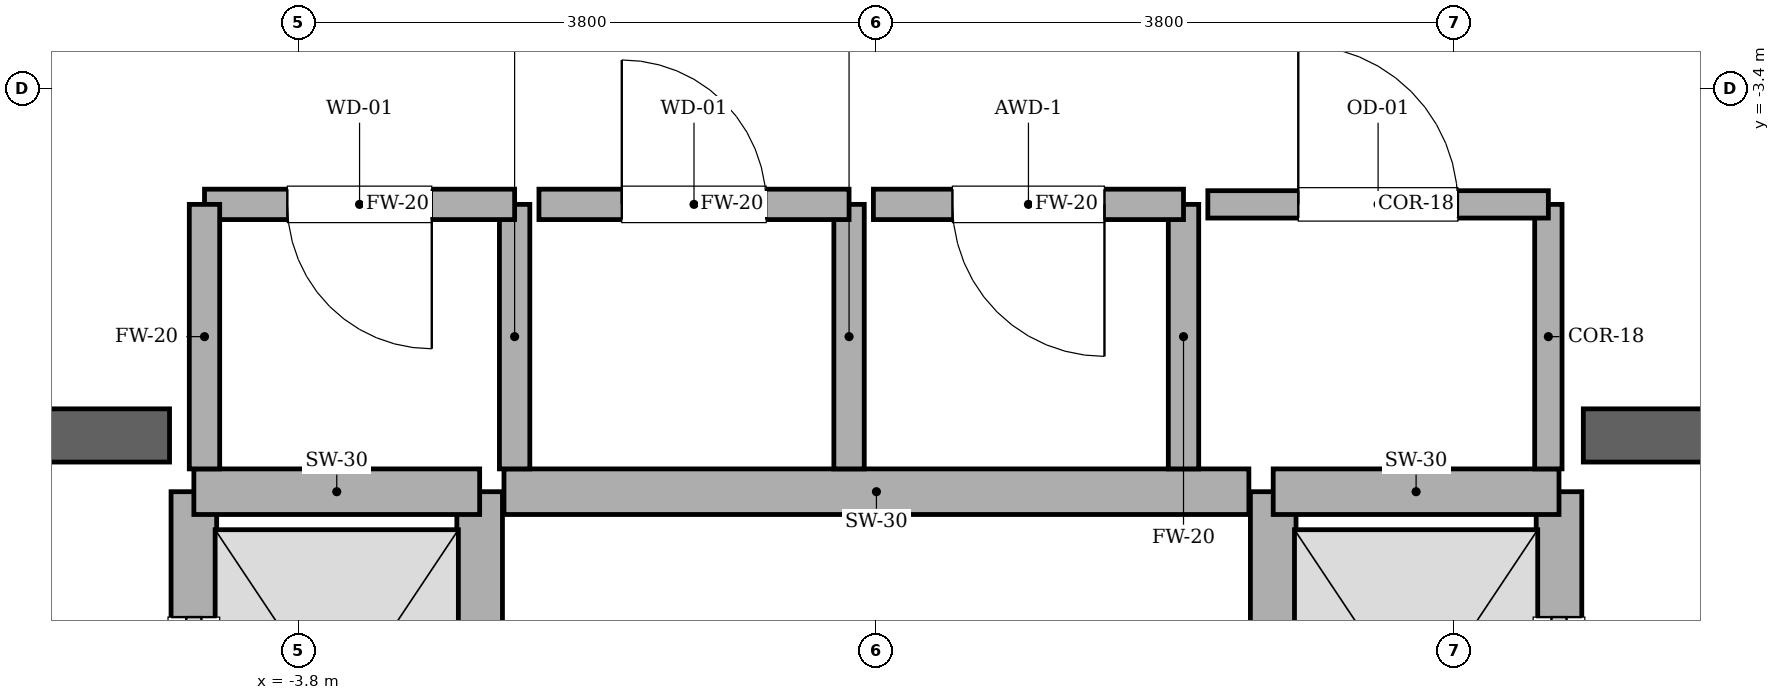
"""IFC4 building model, lengths in metres.
Left out: names, types, materials, properties, quantities, classifications, styles, units other than length and angle.
Written with IfcOpenShell. Run it as: python <this file> out.ifc"""

import sys

from ifc_helpers import new_model, si_unit, direction, frame, frame_2d, origin, place, context, subcontext, project, spatial, rectangle, extrude, element, fill, save


model = new_model("IFC4")
c1 = context("Model", 3, precision=1e-05, world=origin(), true_north=direction((0.0, 1.0)))
c2 = subcontext(c1, "Body", "Model", "MODEL_VIEW")
j1 = project(units=[si_unit("LENGTHUNIT", "METRE"), si_unit("PLANEANGLEUNIT", "RADIAN")], contexts=[c1])
p1 = place(None, origin())
s1 = spatial("IfcSite", under=j1, at=p1, CompositionType="ELEMENT")
p2 = place(p1, origin())
s2 = spatial("IfcBuilding", under=s1, at=p2, CompositionType="ELEMENT")
p3 = place(p2, frame((0.0, 0.0, 28.2)))
s3 = spatial("IfcBuildingStorey", under=s2, at=p3, CompositionType="ELEMENT", Elevation=28.2)
p4 = place(p3, frame((-9.825, -5.68, 0.0), z_axis=(0.0, 0.0, 1.0), x_axis=(1.0, 0.0, 0.0)))
e1 = element("IfcWall", 1, at=p4, inside=s3, PredefinedType="SOLIDWALL", context=c2, shape_type="SweptSolid", body=[
    extrude(rectangle(XDim=5.175, YDim=0.35, at=frame_2d((2.587, 0.0))), origin(), (0.0, 0.0, 1.0), 4.05),
])
p5 = place(p4, frame((1.285, 0.0, 0.0)))
e2 = element("IfcOpeningElement", 2, at=p5, cuts=e1, PredefinedType="OPENING", context=c2, shape_type="SweptSolid", body=[
    extrude(rectangle(XDim=1.18, YDim=2.2, at=frame_2d((0.59, 1.1))), frame((0.0, 0.185, 0.0), z_axis=(0.0, -1.0, 0.0), x_axis=(1.0, 0.0, 0.0)), (0.0, 0.0, 1.0), 0.37),
])
p6 = place(p3, frame((4.65, -5.68, 0.0), z_axis=(0.0, 0.0, 1.0), x_axis=(1.0, 0.0, 0.0)))
e3 = element("IfcWall", 3, at=p6, inside=s3, PredefinedType="SOLIDWALL", context=c2, shape_type="SweptSolid", body=[
    extrude(rectangle(XDim=5.175, YDim=0.35, at=frame_2d((2.587, 0.0))), origin(), (0.0, 0.0, 1.0), 4.05),
])
p7 = place(p6, frame((2.71, 0.0, 0.0)))
e4 = element("IfcOpeningElement", 4, at=p7, cuts=e3, PredefinedType="OPENING", context=c2, shape_type="SweptSolid", body=[
    extrude(rectangle(XDim=1.18, YDim=2.2, at=frame_2d((0.59, 1.1))), frame((0.0, 0.185, 0.0), z_axis=(0.0, -1.0, 0.0), x_axis=(1.0, 0.0, 0.0)), (0.0, 0.0, 1.0), 0.37),
])
p8 = place(p3, frame((-4.49, -8.82, 0.0), z_axis=(0.0, 0.0, 1.0), x_axis=(0.0, 1.0, 0.0)))
e5 = element("IfcWall", 5, at=p8, inside=s3, PredefinedType="SOLIDWALL", context=c2, shape_type="SweptSolid", body=[
    extrude(rectangle(XDim=2.77, YDim=0.3, at=frame_2d((1.385, 0.0))), origin(), (0.0, 0.0, 1.0), 3.81),
])
p9 = place(p8, frame((0.825, 0.0, 0.0)))
e6 = element("IfcOpeningElement", 6, at=p9, cuts=e5, PredefinedType="OPENING", context=c2, shape_type="SweptSolid", body=[
    extrude(rectangle(XDim=1.12, YDim=2.25, at=frame_2d((0.56, 1.125))), frame((0.0, 0.16, 0.0), z_axis=(0.0, -1.0, 0.0), x_axis=(1.0, 0.0, 0.0)), (0.0, 0.0, 1.0), 0.32),
])
p10 = place(p3, frame((-2.61, -8.82, 0.0), z_axis=(0.0, 0.0, 1.0), x_axis=(0.0, 1.0, 0.0)))
e7 = element("IfcWall", 7, at=p10, inside=s3, PredefinedType="SOLIDWALL", context=c2, shape_type="SweptSolid", body=[
    extrude(rectangle(XDim=2.77, YDim=0.3, at=frame_2d((1.385, 0.0))), origin(), (0.0, 0.0, 1.0), 3.81),
])
p11 = place(p3, frame((-4.49, -6.05, 0.0), z_axis=(0.0, 0.0, 1.0), x_axis=(1.0, 0.0, 0.0)))
e8 = element("IfcWall", 8, at=p11, inside=s3, PredefinedType="SOLIDWALL", context=c2, shape_type="SweptSolid", body=[
    extrude(rectangle(XDim=1.88, YDim=0.3, at=frame_2d((0.94, 0.0))), origin(), (0.0, 0.0, 1.0), 3.81),
])
p12 = place(p3, frame((4.49, -8.82, 0.0), z_axis=(0.0, 0.0, 1.0), x_axis=(0.0, 1.0, 0.0)))
e9 = element("IfcWall", 9, at=p12, inside=s3, PredefinedType="SOLIDWALL", context=c2, shape_type="SweptSolid", body=[
    extrude(rectangle(XDim=2.77, YDim=0.3, at=frame_2d((1.385, 0.0))), origin(), (0.0, 0.0, 1.0), 3.81),
])
p13 = place(p12, frame((0.825, 0.0, 0.0)))
e10 = element("IfcOpeningElement", 10, at=p13, cuts=e9, PredefinedType="OPENING", context=c2, shape_type="SweptSolid", body=[
    extrude(rectangle(XDim=1.12, YDim=2.25, at=frame_2d((0.56, 1.125))), frame((0.0, 0.16, 0.0), z_axis=(0.0, -1.0, 0.0), x_axis=(1.0, 0.0, 0.0)), (0.0, 0.0, 1.0), 0.32),
])
p14 = place(p3, frame((2.61, -8.82, 0.0), z_axis=(0.0, 0.0, 1.0), x_axis=(0.0, 1.0, 0.0)))
e11 = element("IfcWall", 11, at=p14, inside=s3, PredefinedType="SOLIDWALL", context=c2, shape_type="SweptSolid", body=[
    extrude(rectangle(XDim=2.77, YDim=0.3, at=frame_2d((1.385, 0.0))), origin(), (0.0, 0.0, 1.0), 3.81),
])
p15 = place(p3, frame((2.61, -6.05, 0.0), z_axis=(0.0, 0.0, 1.0), x_axis=(1.0, 0.0, 0.0)))
e12 = element("IfcWall", 12, at=p15, inside=s3, PredefinedType="SOLIDWALL", context=c2, shape_type="SweptSolid", body=[
    extrude(rectangle(XDim=1.88, YDim=0.3, at=frame_2d((0.94, 0.0))), origin(), (0.0, 0.0, 1.0), 3.81),
])
p16 = place(p3, frame((-2.45, -6.05, 0.0), z_axis=(0.0, 0.0, 1.0), x_axis=(1.0, 0.0, 0.0)))
e13 = element("IfcWall", 13, at=p16, inside=s3, PredefinedType="SOLIDWALL", context=c2, shape_type="SweptSolid", body=[
    extrude(rectangle(XDim=4.9, YDim=0.3, at=frame_2d((2.45, 0.0))), origin(), (0.0, 0.0, 1.0), 3.81),
])
p17 = place(p3, frame((-2.38, -5.9, 0.0), z_axis=(0.0, 0.0, 1.0), x_axis=(0.0, 1.0, 0.0)))
e14 = element("IfcWall", 14, at=p17, inside=s3, PredefinedType="SOLIDWALL", context=c2, shape_type="SweptSolid", body=[
    extrude(rectangle(XDim=1.74, YDim=0.2, at=frame_2d((0.87, 0.0))), origin(), (0.0, 0.0, 1.0), 3.81),
])
p18 = place(p3, frame((-2.38, -4.16, 0.0), z_axis=(0.0, 0.0, 1.0), x_axis=(-1.0, 0.0, 0.0)))
e15 = element("IfcWall", 15, at=p18, inside=s3, PredefinedType="SOLIDWALL", context=c2, shape_type="SweptSolid", body=[
    extrude(rectangle(XDim=2.04, YDim=0.2, at=frame_2d((1.02, 0.0))), origin(), (0.0, 0.0, 1.0), 3.81),
])
p19 = place(p18, frame((0.545, 0.0, 0.0)))
e16 = element("IfcOpeningElement", 16, at=p19, cuts=e15, PredefinedType="OPENING", context=c2, shape_type="SweptSolid", body=[
    extrude(rectangle(XDim=0.95, YDim=2.15, at=frame_2d((0.475, 1.075))), frame((0.0, 0.11, 0.0), z_axis=(0.0, -1.0, 0.0), x_axis=(1.0, 0.0, 0.0)), (0.0, 0.0, 1.0), 0.22),
])
for number, where, z_axis, x_axis in (
    (17, (-4.42, -4.16, 0.0), (0.0, 0.0, 1.0), (0.0, -1.0, 0.0)),
    (18, (-0.18, -5.9, 0.0), (0.0, 0.0, 1.0), (0.0, 1.0, 0.0)),
):
    element("IfcWall", number, at=place(p3, frame(where, z_axis=z_axis, x_axis=x_axis)), inside=s3, PredefinedType="SOLIDWALL", context=c2, shape_type="SweptSolid", body=[
        extrude(rectangle(XDim=1.74, YDim=0.2, at=frame_2d((0.87, 0.0))), origin(), (0.0, 0.0, 1.0), 3.81),
    ])
p20 = place(p3, frame((-0.18, -4.16, 0.0), z_axis=(0.0, 0.0, 1.0), x_axis=(-1.0, 0.0, 0.0)))
e19 = element("IfcWall", 19, at=p20, inside=s3, PredefinedType="SOLIDWALL", context=c2, shape_type="SweptSolid", body=[
    extrude(rectangle(XDim=2.04, YDim=0.2, at=frame_2d((1.02, 0.0))), origin(), (0.0, 0.0, 1.0), 3.81),
])
p21 = place(p20, frame((0.545, 0.0, 0.0)))
e20 = element("IfcOpeningElement", 20, at=p21, cuts=e19, PredefinedType="OPENING", context=c2, shape_type="SweptSolid", body=[
    extrude(rectangle(XDim=0.95, YDim=2.15, at=frame_2d((0.475, 1.075))), frame((0.0, 0.11, 0.0), z_axis=(0.0, -1.0, 0.0), x_axis=(1.0, 0.0, 0.0)), (0.0, 0.0, 1.0), 0.22),
])
p22 = place(p3, frame((2.02, -5.9, 0.0), z_axis=(0.0, 0.0, 1.0), x_axis=(0.0, 1.0, 0.0)))
e21 = element("IfcWall", 21, at=p22, inside=s3, PredefinedType="SOLIDWALL", context=c2, shape_type="SweptSolid", body=[
    extrude(rectangle(XDim=1.74, YDim=0.2, at=frame_2d((0.87, 0.0))), origin(), (0.0, 0.0, 1.0), 3.81),
])
p23 = place(p3, frame((2.02, -4.16, 0.0), z_axis=(0.0, 0.0, 1.0), x_axis=(-1.0, 0.0, 0.0)))
e22 = element("IfcWall", 22, at=p23, inside=s3, PredefinedType="SOLIDWALL", context=c2, shape_type="SweptSolid", body=[
    extrude(rectangle(XDim=2.04, YDim=0.2, at=frame_2d((1.02, 0.0))), origin(), (0.0, 0.0, 1.0), 3.81),
])
p24 = place(p23, frame((0.52, 0.0, 0.0)))
e23 = element("IfcOpeningElement", 23, at=p24, cuts=e22, PredefinedType="OPENING", context=c2, shape_type="SweptSolid", body=[
    extrude(rectangle(XDim=1.0, YDim=2.15, at=frame_2d((0.5, 1.075))), frame((0.0, 0.11, 0.0), z_axis=(0.0, -1.0, 0.0), x_axis=(1.0, 0.0, 0.0)), (0.0, 0.0, 1.0), 0.22),
])
p25 = place(p3, frame((4.42, -5.9, 0.0), z_axis=(0.0, 0.0, 1.0), x_axis=(0.0, 1.0, 0.0)))
e24 = element("IfcWall", 24, at=p25, inside=s3, PredefinedType="PARTITIONING", context=c2, shape_type="SweptSolid", body=[
    extrude(rectangle(XDim=1.74, YDim=0.18, at=frame_2d((0.87, 0.0))), origin(), (0.0, 0.0, 1.0), 3.81),
])
p26 = place(p3, frame((4.42, -4.16, 0.0), z_axis=(0.0, 0.0, 1.0), x_axis=(-1.0, 0.0, 0.0)))
e25 = element("IfcWall", 25, at=p26, inside=s3, PredefinedType="PARTITIONING", context=c2, shape_type="SweptSolid", body=[
    extrude(rectangle(XDim=2.24, YDim=0.18, at=frame_2d((1.12, 0.0))), origin(), (0.0, 0.0, 1.0), 3.81),
])
p27 = place(p26, frame((0.595, 0.0, 0.0)))
e26 = element("IfcOpeningElement", 26, at=p27, cuts=e25, PredefinedType="OPENING", context=c2, shape_type="SweptSolid", body=[
    extrude(rectangle(XDim=1.05, YDim=2.2, at=frame_2d((0.525, 1.1))), frame((0.0, 0.1, 0.0), z_axis=(0.0, -1.0, 0.0), x_axis=(1.0, 0.0, 0.0)), (0.0, 0.0, 1.0), 0.2),
])
p28 = place(p9, origin())
e27 = element("IfcDoor", 27, at=p28, inside=s3, OperationType="SLIDING_TO_LEFT", PredefinedType="DOOR", context=c2, shape_type="SweptSolid", body=[
    extrude(rectangle(XDim=1.12, YDim=2.25, at=frame_2d((0.56, 1.125))), frame((0.0, 0.025, 0.0), z_axis=(0.0, -1.0, 0.0), x_axis=(1.0, 0.0, 0.0)), (0.0, 0.0, 1.0), 0.05),
])
fill(e6, e27)
p29 = place(p13, origin())
e28 = element("IfcDoor", 28, at=p29, inside=s3, OperationType="SLIDING_TO_RIGHT", PredefinedType="DOOR", context=c2, shape_type="SweptSolid", body=[
    extrude(rectangle(XDim=1.12, YDim=2.25, at=frame_2d((0.56, 1.125))), frame((0.0, 0.025, 0.0), z_axis=(0.0, -1.0, 0.0), x_axis=(1.0, 0.0, 0.0)), (0.0, 0.0, 1.0), 0.05),
])
fill(e10, e28)
p30 = place(p19, origin())
e29 = element("IfcDoor", 29, at=p30, inside=s3, OperationType="SINGLE_SWING_LEFT", PredefinedType="DOOR", context=c2, shape_type="SweptSolid", body=[
    extrude(rectangle(XDim=0.95, YDim=2.15, at=frame_2d((0.475, 1.075))), frame((0.0, 0.025, 0.0), z_axis=(0.0, -1.0, 0.0), x_axis=(1.0, 0.0, 0.0)), (0.0, 0.0, 1.0), 0.05),
])
fill(e16, e29)
p31 = place(p21, origin())
e30 = element("IfcDoor", 30, at=p31, inside=s3, OperationType="SINGLE_SWING_RIGHT", PredefinedType="DOOR", context=c2, shape_type="SweptSolid", body=[
    extrude(rectangle(XDim=0.95, YDim=2.15, at=frame_2d((0.475, 1.075))), frame((0.0, 0.025, 0.0), z_axis=(0.0, -1.0, 0.0), x_axis=(1.0, 0.0, 0.0)), (0.0, 0.0, 1.0), 0.05),
])
fill(e20, e30)
p32 = place(p24, origin())
e31 = element("IfcDoor", 31, at=p32, inside=s3, OperationType="SINGLE_SWING_LEFT", PredefinedType="DOOR", context=c2, shape_type="SweptSolid", body=[
    extrude(rectangle(XDim=1.0, YDim=2.15, at=frame_2d((0.5, 1.075))), frame((0.0, 0.025, 0.0), z_axis=(0.0, -1.0, 0.0), x_axis=(1.0, 0.0, 0.0)), (0.0, 0.0, 1.0), 0.05),
])
fill(e23, e31)
p33 = place(p27, origin())
e32 = element("IfcDoor", 32, at=p33, inside=s3, OperationType="SINGLE_SWING_RIGHT", PredefinedType="DOOR", context=c2, shape_type="SweptSolid", body=[
    extrude(rectangle(XDim=1.05, YDim=2.2, at=frame_2d((0.525, 1.1))), frame((0.0, 0.025, 0.0), z_axis=(0.0, -1.0, 0.0), x_axis=(1.0, 0.0, 0.0)), (0.0, 0.0, 1.0), 0.05),
])
fill(e26, e32)
save(model, sys.argv[1])
